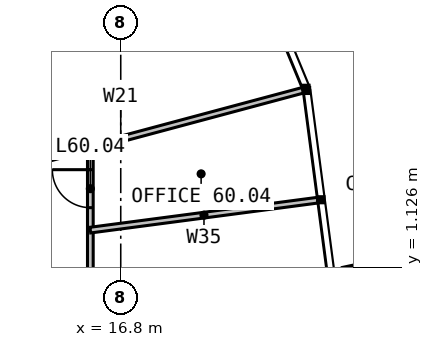
"""IFC4 building model, lengths in metres.
Left out: names, types, materials, properties, quantities, classifications, styles, units other than length and angle.
Written with IfcOpenShell. Run it as: python <this file> out.ifc"""

import sys

from ifc_helpers import new_model, si_unit, direction, frame, frame_2d, origin, place, context, subcontext, project, spatial, rectangle, extrude, element, fill, save


model = new_model("IFC4")
c1 = context("Model", 3, precision=1e-05, world=origin(), true_north=direction((0.0, 1.0)))
c2 = subcontext(c1, "Body", "Model", "MODEL_VIEW")
j1 = project(units=[si_unit("LENGTHUNIT", "METRE"), si_unit("PLANEANGLEUNIT", "RADIAN")], contexts=[c1])
p1 = place(None, origin())
s1 = spatial("IfcSite", under=j1, at=p1, CompositionType="ELEMENT")
p2 = place(p1, origin())
s2 = spatial("IfcBuilding", under=s1, at=p2, CompositionType="ELEMENT")
p3 = place(p2, frame((0.0, 0.0, 248.0)))
s3 = spatial("IfcBuildingStorey", under=s2, at=p3, CompositionType="ELEMENT", Elevation=248.0)
p4 = place(p3, frame((12.0, 3.215, 0.0), z_axis=(0.0, 0.0, 1.0), x_axis=(0.965922720407, 0.258830636135, 0.0)))
e1 = element("IfcWall", 1, at=p4, inside=s3, PredefinedType="PARTITIONING", context=c2, shape_type="SweptSolid", body=[
    extrude(rectangle(XDim=9.938, YDim=0.15, at=frame_2d((4.969, 0.0))), origin(), (0.0, 0.0, 1.0), 2.79),
])
p5 = place(p3, frame((16.0, -9.238, 0.0), z_axis=(0.0, 0.0, 1.0), x_axis=(0.0, 1.0, 0.0)))
e2 = element("IfcWall", 2, at=p5, inside=s3, PredefinedType="PARTITIONING", context=c2, shape_type="SweptSolid", body=[
    extrude(rectangle(XDim=13.525, YDim=0.15, at=frame_2d((6.762, 0.0))), origin(), (0.0, 0.0, 1.0), 2.79),
])
p6 = place(p5, frame((1.975, 0.0, 0.0)))
e3 = element("IfcOpeningElement", 3, at=p6, cuts=e2, PredefinedType="OPENING", context=c2, shape_type="SweptSolid", body=[
    extrude(rectangle(XDim=1.0, YDim=2.2, at=frame_2d((0.5, 1.1))), frame((0.0, 0.085, 0.0), z_axis=(0.0, -1.0, 0.0), x_axis=(1.0, 0.0, 0.0)), (0.0, 0.0, 1.0), 0.17),
])
p7 = place(p5, frame((7.647, 0.0, 0.0)))
e4 = element("IfcOpeningElement", 4, at=p7, cuts=e2, PredefinedType="OPENING", context=c2, shape_type="SweptSolid", body=[
    extrude(rectangle(XDim=1.0, YDim=2.2, at=frame_2d((0.5, 1.1))), frame((0.0, 0.085, 0.0), z_axis=(0.0, -1.0, 0.0), x_axis=(1.0, 0.0, 0.0)), (0.0, 0.0, 1.0), 0.17),
])
p8 = place(p5, frame((11.934, 0.0, 0.0)))
e5 = element("IfcOpeningElement", 5, at=p8, cuts=e2, PredefinedType="OPENING", context=c2, shape_type="SweptSolid", body=[
    extrude(rectangle(XDim=1.0, YDim=2.2, at=frame_2d((0.5, 1.1))), frame((0.0, 0.085, 0.0), z_axis=(0.0, -1.0, 0.0), x_axis=(1.0, 0.0, 0.0)), (0.0, 0.0, 1.0), 0.17),
])
p9 = place(p3, frame((16.0, 2.106, 0.0), z_axis=(0.0, 0.0, 1.0), x_axis=(0.991443960057, 0.130533038219, 0.0)))
e6 = element("IfcWall", 6, at=p9, inside=s3, PredefinedType="PARTITIONING", context=c2, shape_type="SweptSolid", body=[
    extrude(rectangle(XDim=6.032, YDim=0.15, at=frame_2d((3.016, 0.0))), origin(), (0.0, 0.0, 1.0), 2.79),
])
p10 = place(p8, origin())
e7 = element("IfcDoor", 7, at=p10, inside=s3, OperationType="SINGLE_SWING_RIGHT", PredefinedType="DOOR", context=c2, shape_type="SweptSolid", body=[
    extrude(rectangle(XDim=1.0, YDim=2.2, at=frame_2d((0.5, 1.1))), frame((0.0, 0.025, 0.0), z_axis=(0.0, -1.0, 0.0), x_axis=(1.0, 0.0, 0.0)), (0.0, 0.0, 1.0), 0.05),
])
fill(e5, e7)
save(model, sys.argv[1])
